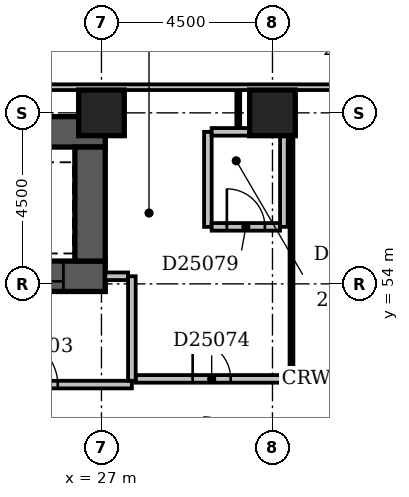
"""IFC4 building model, lengths in metres.
Left out: names, types, materials, properties, quantities, classifications, styles, units other than length and angle.
Written with IfcOpenShell. Run it as: python <this file> out.ifc"""

import sys

from ifc_helpers import new_model, si_unit, direction, frame, frame_2d, origin, origin_2d, place, context, subcontext, project, spatial, rectangle, extrude, element, fill, save


model = new_model("IFC4")
c1 = context("Model", 3, precision=1e-05, world=origin(), true_north=direction((0.0, 1.0)))
c2 = subcontext(c1, "Body", "Model", "MODEL_VIEW")
j1 = project(units=[si_unit("LENGTHUNIT", "METRE"), si_unit("PLANEANGLEUNIT", "RADIAN")], contexts=[c1])
p1 = place(None, origin())
s1 = spatial("IfcSite", under=j1, at=p1, CompositionType="ELEMENT")
p2 = place(p1, origin())
s2 = spatial("IfcBuilding", under=s1, at=p2, CompositionType="ELEMENT")
p3 = place(p2, frame((0.0, 0.0, 101.0)))
s3 = spatial("IfcBuildingStorey", under=s2, at=p3, CompositionType="ELEMENT", Elevation=101.0)
p4 = place(p3, frame((23.8, 54.2, -0.3), z_axis=(0.0, 0.0, 1.0), x_axis=(1.0, 0.0, 0.0)))
e1 = element("IfcWall", 1, at=p4, inside=s3, PredefinedType="SHEAR", context=c2, shape_type="SweptSolid", body=[
    extrude(rectangle(XDim=3.3, YDim=0.8, at=frame_2d((1.65, 0.0))), origin(), (0.0, 0.0, 1.0), 3.6),
])
p5 = place(p4, frame((1.1, 0.0, 0.3)))
e2 = element("IfcOpeningElement", 2, at=p5, cuts=e1, PredefinedType="OPENING", context=c2, shape_type="SweptSolid", body=[
    extrude(rectangle(XDim=1.1, YDim=2.1, at=frame_2d((0.55, 1.05))), frame((0.0, 0.412, 0.0), z_axis=(0.0, -1.0, 0.0), x_axis=(1.0, 0.0, 0.0)), (0.0, 0.0, 1.0), 0.824),
])
p6 = place(p3, frame((23.8, 58.0, -0.3), z_axis=(0.0, 0.0, 1.0), x_axis=(1.0, 0.0, 0.0)))
e3 = element("IfcWall", 3, at=p6, inside=s3, PredefinedType="SHEAR", context=c2, shape_type="SweptSolid", body=[
    extrude(rectangle(XDim=3.3, YDim=0.8, at=frame_2d((1.65, 0.0))), origin(), (0.0, 0.0, 1.0), 3.6),
])
p7 = place(p3, frame((26.7, 54.6, -0.3), z_axis=(0.0, 0.0, 1.0), x_axis=(0.0, 1.0, 0.0)))
e4 = element("IfcWall", 4, at=p7, inside=s3, PredefinedType="SHEAR", context=c2, shape_type="SweptSolid", body=[
    extrude(rectangle(XDim=3.0, YDim=0.8, at=frame_2d((1.5, 0.0))), origin(), (0.0, 0.0, 1.0), 3.6),
])
for number, where, z_axis, x_axis in (
    (5, (27.0, 58.5, -0.3), (0.0, 0.0, 1.0), (1.0, 0.0, 0.0)),
    (6, (31.5, 58.5, -0.3), (0.0, 0.0, 1.0), (1.0, 0.0, 0.0)),
):
    element("IfcColumn", number, at=place(p3, frame(where, z_axis=z_axis, x_axis=x_axis)), inside=s3, PredefinedType="COLUMN", context=c2, shape_type="SweptSolid", body=[
        extrude(rectangle(XDim=1.2, YDim=1.2, at=origin_2d()), origin(), (0.0, 0.0, 1.0), 3.6),
    ])
p8 = place(p3, frame((68.1, 59.175, 0.0), z_axis=(0.0, 0.0, 1.0), x_axis=(-1.0, 0.0, 0.0)))
e7 = element("IfcWall", 7, at=p8, inside=s3, PredefinedType="STANDARD", context=c2, shape_type="SweptSolid", body=[
    extrude(rectangle(XDim=68.85, YDim=0.15, at=frame_2d((34.425, 0.0))), origin(), (0.0, 0.0, 1.0), 2.7),
])
p9 = place(p8, frame((1.65, 0.0, 0.6)))
e8 = element("IfcOpeningElement", 8, at=p9, cuts=e7, PredefinedType="OPENING", context=c2, shape_type="SweptSolid", body=[
    extrude(rectangle(XDim=2.4, YDim=1.8, at=frame_2d((1.2, 0.9))), frame((0.0, 0.087, 0.0), z_axis=(0.0, -1.0, 0.0), x_axis=(1.0, 0.0, 0.0)), (0.0, 0.0, 1.0), 0.174),
])
p10 = place(p8, frame((6.324, 0.0, 0.6)))
e9 = element("IfcOpeningElement", 9, at=p10, cuts=e7, PredefinedType="OPENING", context=c2, shape_type="SweptSolid", body=[
    extrude(rectangle(XDim=2.4, YDim=1.8, at=frame_2d((1.2, 0.9))), frame((0.0, 0.087, 0.0), z_axis=(0.0, -1.0, 0.0), x_axis=(1.0, 0.0, 0.0)), (0.0, 0.0, 1.0), 0.174),
])
p11 = place(p3, frame((23.0, 51.35, 0.0), z_axis=(0.0, 0.0, 1.0), x_axis=(1.0, 0.0, 0.0)))
e10 = element("IfcWall", 10, at=p11, inside=s3, PredefinedType="PARTITIONING", context=c2, shape_type="SweptSolid", body=[
    extrude(rectangle(XDim=4.8, YDim=0.2, at=frame_2d((2.4, 0.0))), origin(), (0.0, 0.0, 1.0), 3.3),
])
p12 = place(p11, frame((1.65, 0.0, 0.0)))
e11 = element("IfcOpeningElement", 11, at=p12, cuts=e10, PredefinedType="OPENING", context=c2, shape_type="SweptSolid", body=[
    extrude(rectangle(XDim=1.2, YDim=2.1, at=frame_2d((0.6, 1.05))), frame((0.0, 0.112, 0.0), z_axis=(0.0, -1.0, 0.0), x_axis=(1.0, 0.0, 0.0)), (0.0, 0.0, 1.0), 0.224),
])
p13 = place(p3, frame((27.8, 51.45, 0.0), z_axis=(0.0, 0.0, 1.0), x_axis=(0.0, 1.0, 0.0)))
e12 = element("IfcWall", 12, at=p13, inside=s3, PredefinedType="PARTITIONING", context=c2, shape_type="SweptSolid", body=[
    extrude(rectangle(XDim=2.75, YDim=0.2, at=frame_2d((1.375, 0.0))), origin(), (0.0, 0.0, 1.0), 3.3),
])
p14 = place(p3, frame((27.1, 54.2, 0.0), z_axis=(0.0, 0.0, 1.0), x_axis=(1.0, 0.0, 0.0)))
e13 = element("IfcWall", 13, at=p14, inside=s3, PredefinedType="PARTITIONING", context=c2, shape_type="SweptSolid", body=[
    extrude(rectangle(XDim=0.6, YDim=0.2, at=frame_2d((0.3, 0.0))), origin(), (0.0, 0.0, 1.0), 3.3),
])
p15 = place(p3, frame((27.9, 51.5, 0.0), z_axis=(0.0, 0.0, 1.0), x_axis=(1.0, 0.0, 0.0)))
e14 = element("IfcWall", 14, at=p15, inside=s3, PredefinedType="PARTITIONING", context=c2, shape_type="SweptSolid", body=[
    extrude(rectangle(XDim=9.3, YDim=0.2, at=frame_2d((4.65, 0.0))), origin(), (0.0, 0.0, 1.0), 3.3),
])
p16 = place(p15, frame((1.5, 0.0, 0.0)))
e15 = element("IfcOpeningElement", 15, at=p16, cuts=e14, PredefinedType="OPENING", context=c2, shape_type="SweptSolid", body=[
    extrude(rectangle(XDim=1.0, YDim=2.1, at=frame_2d((0.5, 1.05))), frame((0.0, 0.112, 0.0), z_axis=(0.0, -1.0, 0.0), x_axis=(1.0, 0.0, 0.0)), (0.0, 0.0, 1.0), 0.224),
])
p17 = place(p15, frame((6.3, 0.0, 0.0)))
e16 = element("IfcOpeningElement", 16, at=p17, cuts=e14, PredefinedType="OPENING", context=c2, shape_type="SweptSolid", body=[
    extrude(rectangle(XDim=0.9, YDim=2.1, at=frame_2d((0.45, 1.05))), frame((0.0, 0.112, 0.0), z_axis=(0.0, -1.0, 0.0), x_axis=(1.0, 0.0, 0.0)), (0.0, 0.0, 1.0), 0.224),
])
p18 = place(p3, frame((32.0, 51.6, 0.0), z_axis=(0.0, 0.0, 1.0), x_axis=(0.0, 1.0, 0.0)))
e17 = element("IfcWall", 17, at=p18, inside=s3, PredefinedType="PARTITIONING", context=c2, shape_type="SweptSolid", body=[
    extrude(rectangle(XDim=6.3, YDim=0.1, at=frame_2d((3.15, 0.0))), origin(), (0.0, 0.0, 1.0), 3.3),
])
p19 = place(p3, frame((29.8, 55.5, 0.0), z_axis=(0.0, 0.0, 1.0), x_axis=(0.0, 1.0, 0.0)))
e18 = element("IfcWall", 18, at=p19, inside=s3, PredefinedType="PARTITIONING", context=c2, shape_type="SweptSolid", body=[
    extrude(rectangle(XDim=2.5, YDim=0.2, at=frame_2d((1.25, 0.0))), origin(), (0.0, 0.0, 1.0), 3.3),
])
p20 = place(p3, frame((29.9, 55.5, 0.0), z_axis=(0.0, 0.0, 1.0), x_axis=(1.0, 0.0, 0.0)))
e19 = element("IfcWall", 19, at=p20, inside=s3, PredefinedType="PARTITIONING", context=c2, shape_type="SweptSolid", body=[
    extrude(rectangle(XDim=1.8, YDim=0.2, at=frame_2d((0.9, 0.0))), origin(), (0.0, 0.0, 1.0), 3.3),
])
p21 = place(p20, frame((0.4, 0.0, 0.0)))
e20 = element("IfcOpeningElement", 20, at=p21, cuts=e19, PredefinedType="OPENING", context=c2, shape_type="SweptSolid", body=[
    extrude(rectangle(XDim=1.0, YDim=2.1, at=frame_2d((0.5, 1.05))), frame((0.0, 0.112, 0.0), z_axis=(0.0, -1.0, 0.0), x_axis=(1.0, 0.0, 0.0)), (0.0, 0.0, 1.0), 0.224),
])
p22 = place(p3, frame((31.8, 55.5, 0.0), z_axis=(0.0, 0.0, 1.0), x_axis=(0.0, 1.0, 0.0)))
e21 = element("IfcWall", 21, at=p22, inside=s3, PredefinedType="PARTITIONING", context=c2, shape_type="SweptSolid", body=[
    extrude(rectangle(XDim=2.5, YDim=0.2, at=frame_2d((1.25, 0.0))), origin(), (0.0, 0.0, 1.0), 3.3),
])
p23 = place(p3, frame((29.9, 58.0, 0.0), z_axis=(0.0, 0.0, 1.0), x_axis=(1.0, 0.0, 0.0)))
e22 = element("IfcWall", 22, at=p23, inside=s3, PredefinedType="PARTITIONING", context=c2, shape_type="SweptSolid", body=[
    extrude(rectangle(XDim=1.8, YDim=0.2, at=frame_2d((0.9, 0.0))), origin(), (0.0, 0.0, 1.0), 3.3),
])
p24 = place(p3, frame((30.6, 58.1, 0.0), z_axis=(0.0, 0.0, 1.0), x_axis=(0.0, 1.0, 0.0)))
e23 = element("IfcWall", 23, at=p24, inside=s3, PredefinedType="PARTITIONING", context=c2, shape_type="SweptSolid", body=[
    extrude(rectangle(XDim=1.0, YDim=0.1, at=frame_2d((0.5, 0.0))), origin(), (0.0, 0.0, 1.0), 3.3),
])
p25 = place(p12, origin())
e24 = element("IfcDoor", 24, at=p25, inside=s3, OperationType="SINGLE_SWING_LEFT", PredefinedType="DOOR", context=c2, shape_type="SweptSolid", body=[
    extrude(rectangle(XDim=1.2, YDim=2.1, at=frame_2d((0.6, 1.05))), frame((0.0, 0.025, 0.0), z_axis=(0.0, -1.0, 0.0), x_axis=(1.0, 0.0, 0.0)), (0.0, 0.0, 1.0), 0.05),
])
fill(e11, e24)
p26 = place(p5, origin())
e25 = element("IfcDoor", 25, at=p26, inside=s3, OperationType="SLIDING_TO_LEFT", PredefinedType="DOOR", context=c2, shape_type="SweptSolid", body=[
    extrude(rectangle(XDim=1.1, YDim=2.1, at=frame_2d((0.55, 1.05))), frame((0.0, 0.025, 0.0), z_axis=(0.0, -1.0, 0.0), x_axis=(1.0, 0.0, 0.0)), (0.0, 0.0, 1.0), 0.05),
])
fill(e2, e25)
p27 = place(p16, origin())
e26 = element("IfcDoor", 26, at=p27, inside=s3, OperationType="SINGLE_SWING_LEFT", PredefinedType="DOOR", context=c2, shape_type="SweptSolid", body=[
    extrude(rectangle(XDim=1.0, YDim=2.1, at=frame_2d((0.5, 1.05))), frame((0.0, 0.025, 0.0), z_axis=(0.0, -1.0, 0.0), x_axis=(1.0, 0.0, 0.0)), (0.0, 0.0, 1.0), 0.05),
])
fill(e15, e26)
p28 = place(p21, origin())
e27 = element("IfcDoor", 27, at=p28, inside=s3, OperationType="SINGLE_SWING_LEFT", PredefinedType="DOOR", context=c2, shape_type="SweptSolid", body=[
    extrude(rectangle(XDim=1.0, YDim=2.1, at=frame_2d((0.5, 1.05))), frame((0.0, 0.025, 0.0), z_axis=(0.0, -1.0, 0.0), x_axis=(1.0, 0.0, 0.0)), (0.0, 0.0, 1.0), 0.05),
])
fill(e20, e27)
save(model, sys.argv[1])
